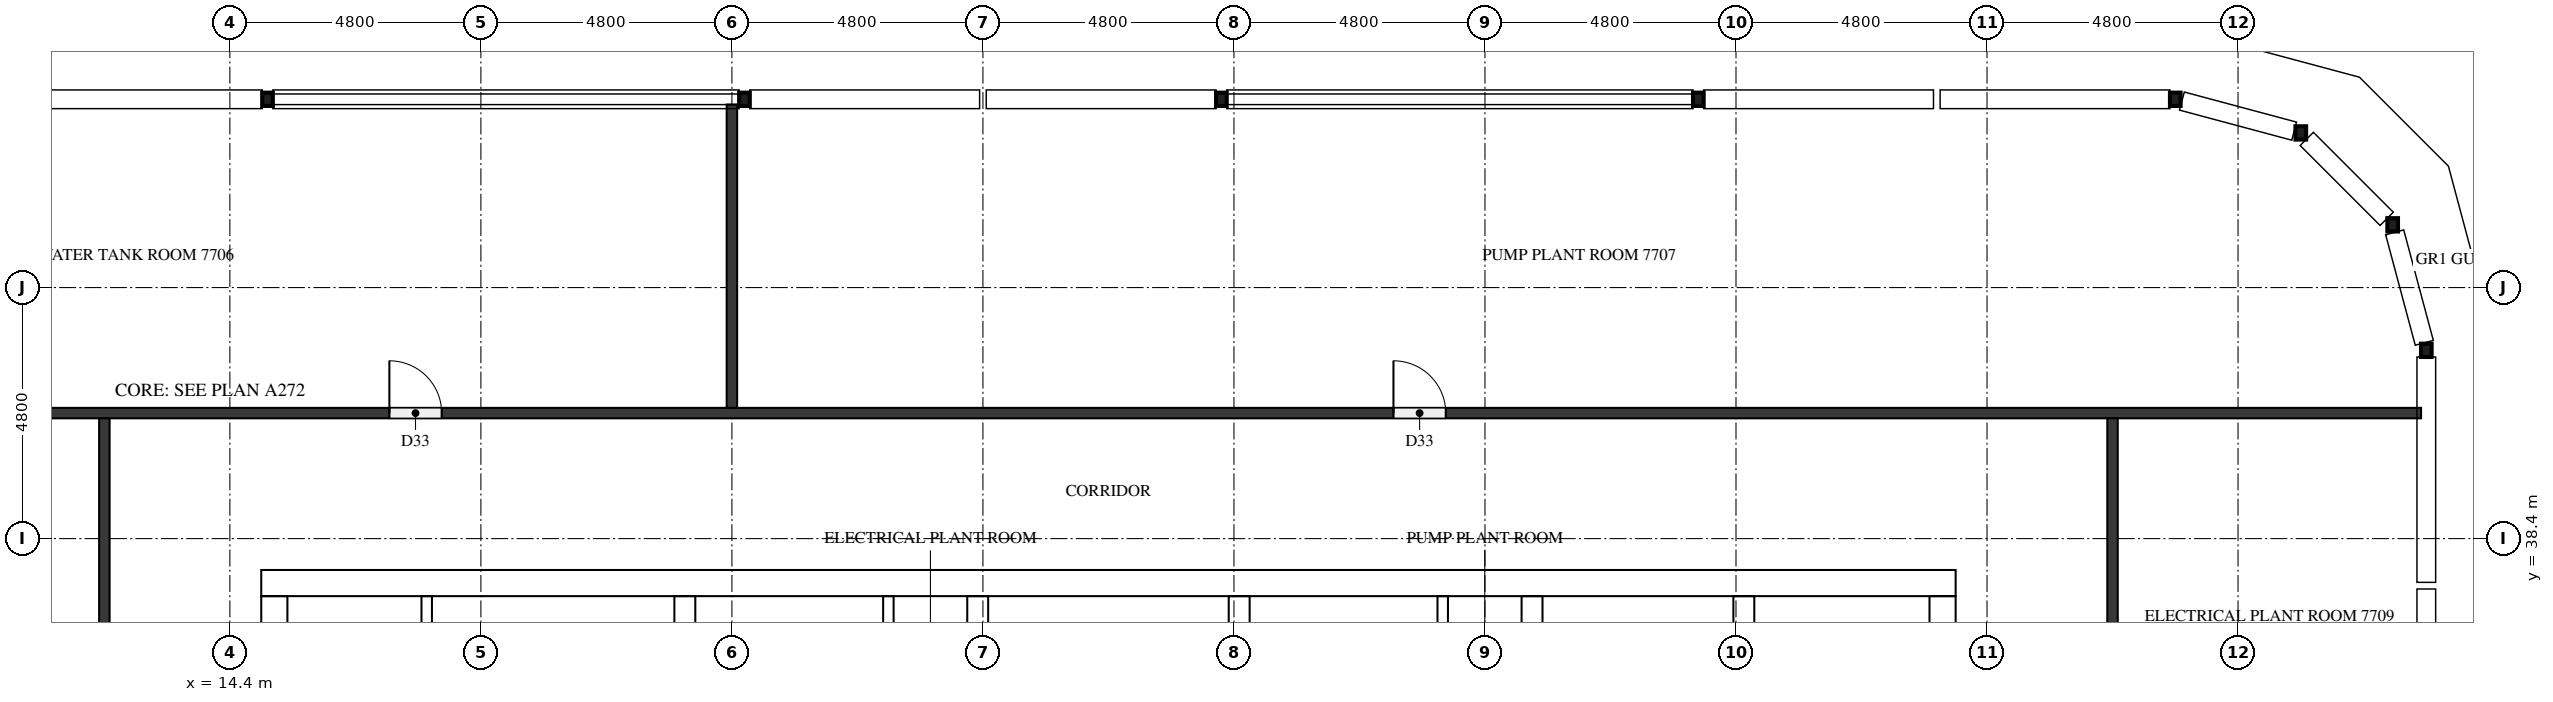
"""IFC4 building model, lengths in metres.
Left out: names, types, materials, properties, quantities, classifications, styles, units other than length and angle.
Written with IfcOpenShell. Run it as: python <this file> out.ifc"""

import sys

from ifc_helpers import new_model, si_unit, direction, frame, frame_2d, origin, origin_2d, place, context, subcontext, project, spatial, rectangle, hollow_rectangle, extrude, element, fill, save


model = new_model("IFC4")
c1 = context("Model", 3, precision=1e-05, world=origin(), true_north=direction((0.0, 1.0)))
c2 = subcontext(c1, "Body", "Model", "MODEL_VIEW")
j1 = project(units=[si_unit("LENGTHUNIT", "METRE"), si_unit("PLANEANGLEUNIT", "RADIAN")], contexts=[c1])
p1 = place(None, origin())
s1 = spatial("IfcSite", under=j1, at=p1, CompositionType="ELEMENT")
p2 = place(p1, origin())
s2 = spatial("IfcBuilding", under=s1, at=p2, CompositionType="ELEMENT")
p3 = place(p2, frame((0.0, 0.0, 296.3)))
s3 = spatial("IfcBuildingStorey", under=s2, at=p3, CompositionType="ELEMENT", Elevation=296.3)
p4 = place(p3, frame((15.0, 37.55, 0.0), z_axis=(0.0, 0.0, 1.0), x_axis=(1.0, 0.0, 0.0)))
e1 = element("IfcWall", 1, at=p4, inside=s3, PredefinedType="SHEAR", context=c2, shape_type="SweptSolid", body=[
    extrude(rectangle(XDim=32.4, YDim=0.5, at=frame_2d((16.2, 0.0))), origin(), (0.0, 0.0, 1.0), 4.4),
])
p5 = place(p4, frame((15.3, 0.0, 0.0)))
e2 = element("IfcOpeningElement", 2, at=p5, cuts=e1, PredefinedType="OPENING", context=c2, shape_type="SweptSolid", body=[
    extrude(rectangle(XDim=1.8, YDim=2.1, at=frame_2d((0.9, 1.05))), frame((0.0, 0.26, 0.0), z_axis=(0.0, -1.0, 0.0), x_axis=(1.0, 0.0, 0.0)), (0.0, 0.0, 1.0), 0.52),
])
p6 = place(p4, frame((1.282, 0.0, 0.0)))
e3 = element("IfcOpeningElement", 3, at=p6, cuts=e1, PredefinedType="OPENING", context=c2, shape_type="SweptSolid", body=[
    extrude(rectangle(XDim=1.0, YDim=2.1, at=frame_2d((0.5, 1.05))), frame((0.0, 0.26, 0.0), z_axis=(0.0, -1.0, 0.0), x_axis=(1.0, 0.0, 0.0)), (0.0, 0.0, 1.0), 0.52),
])
p7 = place(p4, frame((5.082, 0.0, 0.0)))
e4 = element("IfcOpeningElement", 4, at=p7, cuts=e1, PredefinedType="OPENING", context=c2, shape_type="SweptSolid", body=[
    extrude(rectangle(XDim=1.0, YDim=2.1, at=frame_2d((0.5, 1.05))), frame((0.0, 0.26, 0.0), z_axis=(0.0, -1.0, 0.0), x_axis=(1.0, 0.0, 0.0)), (0.0, 0.0, 1.0), 0.52),
])
p8 = place(p3, frame((15.25, 15.5, 0.0), z_axis=(0.0, 0.0, 1.0), x_axis=(0.0, 1.0, 0.0)))
e5 = element("IfcWall", 5, at=p8, inside=s3, PredefinedType="SHEAR", context=c2, shape_type="SweptSolid", body=[
    extrude(rectangle(XDim=21.8, YDim=0.5, at=frame_2d((10.9, 0.0))), origin(), (0.0, 0.0, 1.0), 4.4),
])
p9 = place(p8, frame((5.26, 0.0, 0.0)))
e6 = element("IfcOpeningElement", 6, at=p9, cuts=e5, PredefinedType="OPENING", context=c2, shape_type="SweptSolid", body=[
    extrude(rectangle(XDim=1.2, YDim=2.1, at=frame_2d((0.6, 1.05))), frame((0.0, 0.26, 0.0), z_axis=(0.0, -1.0, 0.0), x_axis=(1.0, 0.0, 0.0)), (0.0, 0.0, 1.0), 0.52),
])
p10 = place(p3, frame((47.15, 15.5, 0.0), z_axis=(0.0, 0.0, 1.0), x_axis=(0.0, 1.0, 0.0)))
e7 = element("IfcWall", 7, at=p10, inside=s3, PredefinedType="SHEAR", context=c2, shape_type="SweptSolid", body=[
    extrude(rectangle(XDim=21.8, YDim=0.5, at=frame_2d((10.9, 0.0))), origin(), (0.0, 0.0, 1.0), 4.4),
])
p11 = place(p10, frame((10.6, 0.0, 0.0)))
e8 = element("IfcOpeningElement", 8, at=p11, cuts=e7, PredefinedType="OPENING", context=c2, shape_type="SweptSolid", body=[
    extrude(rectangle(XDim=1.2, YDim=2.1, at=frame_2d((0.6, 1.05))), frame((0.0, 0.26, 0.0), z_axis=(0.0, -1.0, 0.0), x_axis=(1.0, 0.0, 0.0)), (0.0, 0.0, 1.0), 0.52),
])
p12 = place(p3, frame((23.1, 15.5, 0.0), z_axis=(0.0, 0.0, 1.0), x_axis=(0.0, 1.0, 0.0)))
e9 = element("IfcWall", 9, at=p12, inside=s3, PredefinedType="SHEAR", context=c2, shape_type="SweptSolid", body=[
    extrude(rectangle(XDim=21.8, YDim=0.4, at=frame_2d((10.9, 0.0))), origin(), (0.0, 0.0, 1.0), 4.4),
])
p13 = place(p3, frame((39.3, 27.75, 0.0), z_axis=(0.0, 0.0, 1.0), x_axis=(0.0, 1.0, 0.0)))
e10 = element("IfcWall", 10, at=p13, inside=s3, PredefinedType="SHEAR", context=c2, shape_type="SweptSolid", body=[
    extrude(rectangle(XDim=9.55, YDim=0.4, at=frame_2d((4.775, 0.0))), origin(), (0.0, 0.0, 1.0), 4.4),
])
p14 = place(p3, frame((43.35, 27.75, 0.0), z_axis=(0.0, 0.0, 1.0), x_axis=(0.0, 1.0, 0.0)))
e11 = element("IfcWall", 11, at=p14, inside=s3, PredefinedType="SHEAR", context=c2, shape_type="SweptSolid", body=[
    extrude(rectangle(XDim=9.55, YDim=0.4, at=frame_2d((4.775, 0.0))), origin(), (0.0, 0.0, 1.0), 4.4),
])
p15 = place(p14, frame((7.65, 0.0, 0.0)))
e12 = element("IfcOpeningElement", 12, at=p15, cuts=e11, PredefinedType="OPENING", context=c2, shape_type="SweptSolid", body=[
    extrude(rectangle(XDim=1.2, YDim=2.1, at=frame_2d((0.6, 1.05))), frame((0.0, 0.21, 0.0), z_axis=(0.0, -1.0, 0.0), x_axis=(1.0, 0.0, 0.0)), (0.0, 0.0, 1.0), 0.42),
])
for number, where, z_axis, x_axis in (
    (13, (28.7, 33.75, 0.0), (0.0, 0.0, 1.0), (0.0, 1.0, 0.0)),
    (14, (33.7, 33.75, 0.0), (0.0, 0.0, 1.0), (0.0, 1.0, 0.0)),
):
    element("IfcWall", number, at=place(p3, frame(where, z_axis=z_axis, x_axis=x_axis)), inside=s3, PredefinedType="SHEAR", context=c2, shape_type="SweptSolid", body=[
        extrude(rectangle(XDim=3.55, YDim=0.4, at=frame_2d((1.775, 0.0))), origin(), (0.0, 0.0, 1.0), 4.4),
    ])
for number, where, z_axis, x_axis in (
    (15, (56.4, 42.0, 0.0), (0.0, 0.0, 1.0), (1.0, 0.0, 0.0)),
    (16, (55.757, 44.4, 0.0), (0.0, 0.0, 1.0), (1.0, 0.0, 0.0)),
    (17, (54.0, 46.157, 0.0), (0.0, 0.0, 1.0), (1.0, 0.0, 0.0)),
    (18, (51.6, 46.8, 0.0), (0.0, 0.0, 1.0), (1.0, 0.0, 0.0)),
    (19, (42.48, 46.8, 0.0), (0.0, 0.0, 1.0), (1.0, 0.0, 0.0)),
    (20, (33.36, 46.8, 0.0), (0.0, 0.0, 1.0), (1.0, 0.0, 0.0)),
    (21, (24.24, 46.8, 0.0), (0.0, 0.0, 1.0), (1.0, 0.0, 0.0)),
    (22, (15.12, 46.8, 0.0), (0.0, 0.0, 1.0), (1.0, 0.0, 0.0)),
):
    element("IfcColumn", number, at=place(p3, frame(where, z_axis=z_axis, x_axis=x_axis)), inside=s3, PredefinedType="COLUMN", context=c2, shape_type="SweptSolid", body=[
        extrude(hollow_rectangle(XDim=0.203, YDim=0.254, WallThickness=0.01, InnerFilletRadius=0.004, OuterFilletRadius=0.013, at=origin_2d()), origin(), (0.0, 0.0, 1.0), 4.4),
    ])
p16 = place(p3, frame((18.164, 31.45, 0.0), z_axis=(0.0, 0.0, 1.0), x_axis=(0.0, 1.0, 0.0)))
e23 = element("IfcWall", 23, at=p16, inside=s3, PredefinedType="PARTITIONING", context=c2, shape_type="SweptSolid", body=[
    extrude(rectangle(XDim=5.85, YDim=0.2, at=frame_2d((2.925, 0.0))), origin(), (0.0, 0.0, 1.0), 4.4),
])
for number, where, z_axis, x_axis in (
    (24, (26.992, 33.75, 0.0), (0.0, 0.0, 1.0), (0.0, 1.0, 0.0)),
    (25, (37.592, 33.75, 0.0), (0.0, 0.0, 1.0), (0.0, 1.0, 0.0)),
):
    element("IfcWall", number, at=place(p3, frame(where, z_axis=z_axis, x_axis=x_axis)), inside=s3, PredefinedType="PARTITIONING", context=c2, shape_type="SweptSolid", body=[
        extrude(rectangle(XDim=3.55, YDim=0.2, at=frame_2d((1.775, 0.0))), origin(), (0.0, 0.0, 1.0), 4.4),
    ])
p17 = place(p3, frame((1.3, 40.8, 0.0), z_axis=(0.0, 0.0, 1.0), x_axis=(1.0, 0.0, 0.0)))
e26 = element("IfcWall", 26, at=p17, inside=s3, PredefinedType="PARTITIONING", context=c2, shape_type="SweptSolid", body=[
    extrude(rectangle(XDim=55.0, YDim=0.2, at=frame_2d((27.5, 0.0))), origin(), (0.0, 0.0, 1.0), 4.4),
])
p18 = place(p17, frame((16.15, 0.0, 0.0)))
e27 = element("IfcOpeningElement", 27, at=p18, cuts=e26, PredefinedType="OPENING", context=c2, shape_type="SweptSolid", body=[
    extrude(rectangle(XDim=1.0, YDim=2.1, at=frame_2d((0.5, 1.05))), frame((0.0, 0.11, 0.0), z_axis=(0.0, -1.0, 0.0), x_axis=(1.0, 0.0, 0.0)), (0.0, 0.0, 1.0), 0.22),
])
p19 = place(p17, frame((35.35, 0.0, 0.0)))
e28 = element("IfcOpeningElement", 28, at=p19, cuts=e26, PredefinedType="OPENING", context=c2, shape_type="SweptSolid", body=[
    extrude(rectangle(XDim=1.0, YDim=2.1, at=frame_2d((0.5, 1.05))), frame((0.0, 0.11, 0.0), z_axis=(0.0, -1.0, 0.0), x_axis=(1.0, 0.0, 0.0)), (0.0, 0.0, 1.0), 0.22),
])
p20 = place(p3, frame((12.0, 12.1, 0.0), z_axis=(0.0, 0.0, 1.0), x_axis=(0.0, 1.0, 0.0)))
e29 = element("IfcWall", 29, at=p20, inside=s3, PredefinedType="PARTITIONING", context=c2, shape_type="SweptSolid", body=[
    extrude(rectangle(XDim=28.6, YDim=0.2, at=frame_2d((14.3, 0.0))), origin(), (0.0, 0.0, 1.0), 4.4),
])
p21 = place(p20, frame((7.85, 0.0, 0.0)))
e30 = element("IfcOpeningElement", 30, at=p21, cuts=e29, PredefinedType="OPENING", context=c2, shape_type="SweptSolid", body=[
    extrude(rectangle(XDim=1.0, YDim=2.1, at=frame_2d((0.5, 1.05))), frame((0.0, 0.11, 0.0), z_axis=(0.0, -1.0, 0.0), x_axis=(1.0, 0.0, 0.0)), (0.0, 0.0, 1.0), 0.22),
])
p22 = place(p20, frame((22.15, 0.0, 0.0)))
e31 = element("IfcOpeningElement", 31, at=p22, cuts=e29, PredefinedType="OPENING", context=c2, shape_type="SweptSolid", body=[
    extrude(rectangle(XDim=1.0, YDim=2.1, at=frame_2d((0.5, 1.05))), frame((0.0, 0.11, 0.0), z_axis=(0.0, -1.0, 0.0), x_axis=(1.0, 0.0, 0.0)), (0.0, 0.0, 1.0), 0.22),
])
p23 = place(p3, frame((24.0, 40.9, 0.0), z_axis=(0.0, 0.0, 1.0), x_axis=(0.0, 1.0, 0.0)))
e32 = element("IfcWall", 32, at=p23, inside=s3, PredefinedType="PARTITIONING", context=c2, shape_type="SweptSolid", body=[
    extrude(rectangle(XDim=5.8, YDim=0.2, at=frame_2d((2.9, 0.0))), origin(), (0.0, 0.0, 1.0), 4.4),
])
p24 = place(p3, frame((50.4, 40.7, 0.0), z_axis=(0.0, 0.0, 1.0), x_axis=(0.0, -1.0, 0.0)))
e33 = element("IfcWall", 33, at=p24, inside=s3, PredefinedType="PARTITIONING", context=c2, shape_type="SweptSolid", body=[
    extrude(rectangle(XDim=28.6, YDim=0.2, at=frame_2d((14.3, 0.0))), origin(), (0.0, 0.0, 1.0), 4.4),
])
p25 = place(p24, frame((19.75, 0.0, 0.0)))
e34 = element("IfcOpeningElement", 34, at=p25, cuts=e33, PredefinedType="OPENING", context=c2, shape_type="SweptSolid", body=[
    extrude(rectangle(XDim=1.0, YDim=2.1, at=frame_2d((0.5, 1.05))), frame((0.0, 0.11, 0.0), z_axis=(0.0, -1.0, 0.0), x_axis=(1.0, 0.0, 0.0)), (0.0, 0.0, 1.0), 0.22),
])
p26 = place(p24, frame((5.45, 0.0, 0.0)))
e35 = element("IfcOpeningElement", 35, at=p26, cuts=e33, PredefinedType="OPENING", context=c2, shape_type="SweptSolid", body=[
    extrude(rectangle(XDim=1.0, YDim=2.1, at=frame_2d((0.5, 1.05))), frame((0.0, 0.11, 0.0), z_axis=(0.0, -1.0, 0.0), x_axis=(1.0, 0.0, 0.0)), (0.0, 0.0, 1.0), 0.22),
])
p27 = place(p5, origin())
e36 = element("IfcDoor", 36, at=p27, inside=s3, OperationType="DOUBLE_DOOR_SINGLE_SWING", PredefinedType="DOOR", context=c2, shape_type="SweptSolid", body=[
    extrude(rectangle(XDim=1.8, YDim=2.1, at=frame_2d((0.9, 1.05))), frame((0.0, 0.025, 0.0), z_axis=(0.0, -1.0, 0.0), x_axis=(1.0, 0.0, 0.0)), (0.0, 0.0, 1.0), 0.05),
])
fill(e2, e36)
p28 = place(p6, origin())
e37 = element("IfcDoor", 37, at=p28, inside=s3, OperationType="SINGLE_SWING_RIGHT", PredefinedType="DOOR", context=c2, shape_type="SweptSolid", body=[
    extrude(rectangle(XDim=1.0, YDim=2.1, at=frame_2d((0.5, 1.05))), frame((0.0, 0.025, 0.0), z_axis=(0.0, -1.0, 0.0), x_axis=(1.0, 0.0, 0.0)), (0.0, 0.0, 1.0), 0.05),
])
fill(e3, e37)
p29 = place(p7, origin())
e38 = element("IfcDoor", 38, at=p29, inside=s3, OperationType="SINGLE_SWING_LEFT", PredefinedType="DOOR", context=c2, shape_type="SweptSolid", body=[
    extrude(rectangle(XDim=1.0, YDim=2.1, at=frame_2d((0.5, 1.05))), frame((0.0, 0.025, 0.0), z_axis=(0.0, -1.0, 0.0), x_axis=(1.0, 0.0, 0.0)), (0.0, 0.0, 1.0), 0.05),
])
fill(e4, e38)
p30 = place(p18, origin())
e39 = element("IfcDoor", 39, at=p30, inside=s3, OperationType="SINGLE_SWING_LEFT", PredefinedType="DOOR", context=c2, shape_type="SweptSolid", body=[
    extrude(rectangle(XDim=1.0, YDim=2.1, at=frame_2d((0.5, 1.05))), frame((0.0, 0.025, 0.0), z_axis=(0.0, -1.0, 0.0), x_axis=(1.0, 0.0, 0.0)), (0.0, 0.0, 1.0), 0.05),
])
fill(e27, e39)
p31 = place(p19, origin())
e40 = element("IfcDoor", 40, at=p31, inside=s3, OperationType="SINGLE_SWING_LEFT", PredefinedType="DOOR", context=c2, shape_type="SweptSolid", body=[
    extrude(rectangle(XDim=1.0, YDim=2.1, at=frame_2d((0.5, 1.05))), frame((0.0, 0.025, 0.0), z_axis=(0.0, -1.0, 0.0), x_axis=(1.0, 0.0, 0.0)), (0.0, 0.0, 1.0), 0.05),
])
fill(e28, e40)
save(model, sys.argv[1])
